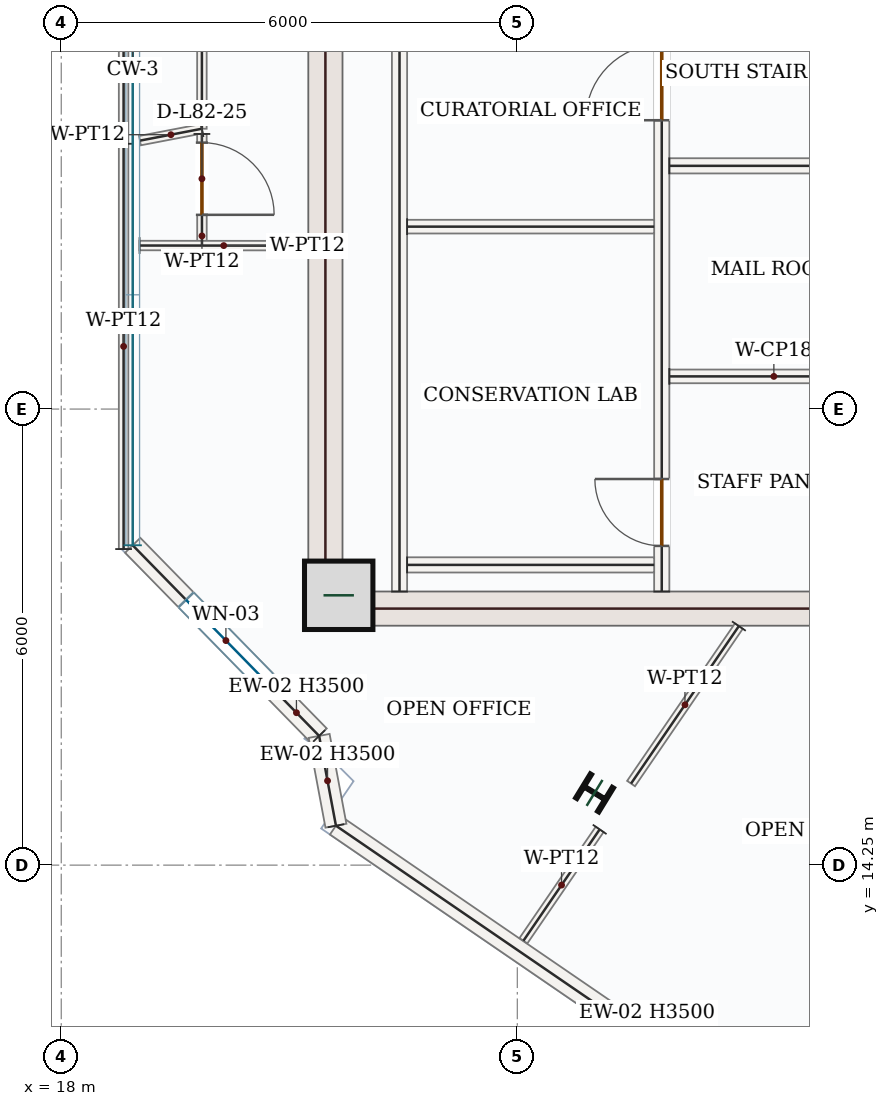
"""IFC4 building model, lengths in metres.
Left out: names, types, materials, properties, quantities, classifications, styles, units other than length and angle.
Written with IfcOpenShell. Run it as: python <this file> out.ifc"""

import sys

from ifc_helpers import new_model, si_unit, direction, frame, frame_2d, origin, origin_2d, place, context, subcontext, project, spatial, rectangle, i_section, extrude, source, transform, mapped, element, fill, save


model = new_model("IFC4")
c1 = context("Model", 3, precision=1e-05, world=origin(), true_north=direction((0.0, 1.0)))
c2 = subcontext(c1, "Body", "Model", "MODEL_VIEW")
j1 = project(units=[si_unit("LENGTHUNIT", "METRE"), si_unit("PLANEANGLEUNIT", "RADIAN")], contexts=[c1])
p1 = place(None, origin())
s1 = spatial("IfcSite", under=j1, at=p1, CompositionType="ELEMENT")
p2 = place(p1, origin())
s2 = spatial("IfcBuilding", under=s1, at=p2, CompositionType="ELEMENT")
p3 = place(p2, frame((0.0, 0.0, 338.55)))
s3 = spatial("IfcBuildingStorey", under=s2, at=p3, CompositionType="ELEMENT", Elevation=338.55)
m1 = source(origin(), c2, "Body", "SweptSolid", [
    extrude(rectangle(XDim=8.55, YDim=0.45, at=frame_2d((4.275, 0.0))), origin(), (0.0, 0.0, 1.0), 3.5),
])
p4 = place(p3, frame((21.475, 17.4, 0.0), z_axis=(0.0, 0.0, 1.0), x_axis=(0.0, 1.0, 0.0)))
e1 = element("IfcWall", 1, at=p4, inside=s3, PredefinedType="SHEAR", context=c2, shape_type="MappedRepresentation", body=[
    mapped(m1, transform((0.0, 0.0, 0.0), x_axis=(1.0, 0.0, 0.0), y_axis=(0.0, 1.0, 0.0), z_axis=(0.0, 0.0, 1.0), scale=1.0)),
])
m2 = source(origin(), c2, "Body", "SweptSolid", [
    extrude(rectangle(XDim=7.1, YDim=0.45, at=frame_2d((3.55, 0.0))), origin(), (0.0, 0.0, 1.0), 3.5),
])
p5 = place(p3, frame((21.7, 17.625, 0.0), z_axis=(0.0, 0.0, 1.0), x_axis=(1.0, 0.0, 0.0)))
e2 = element("IfcWall", 2, at=p5, inside=s3, PredefinedType="SHEAR", context=c2, shape_type="MappedRepresentation", body=[
    mapped(m2, transform((0.0, 0.0, 0.0), x_axis=(1.0, 0.0, 0.0), y_axis=(0.0, 1.0, 0.0), z_axis=(0.0, 0.0, 1.0), scale=1.0)),
])
m3 = source(origin(), c2, "Body", "SweptSolid", [
    extrude(rectangle(XDim=0.9, YDim=0.9, at=origin_2d()), origin(), (0.0, 0.0, 1.0), 3.75),
])
p6 = place(p3, frame((21.65, 17.8, 0.0), z_axis=(0.0, 0.0, 1.0), x_axis=(1.0, 0.0, 0.0)))
e3 = element("IfcColumn", 3, at=p6, inside=s3, PredefinedType="COLUMN", context=c2, shape_type="MappedRepresentation", body=[
    mapped(m3, transform((0.0, 0.0, 0.0), x_axis=(1.0, 0.0, 0.0), y_axis=(0.0, 1.0, 0.0), z_axis=(0.0, 0.0, 1.0), scale=1.0)),
])
m4 = source(origin(), c2, "Body", "SweptSolid", [
    extrude(i_section(OverallWidth=0.369, OverallDepth=0.356, WebThickness=0.011, FlangeThickness=0.018, FilletRadius=0.018, at=origin_2d()), origin(), (0.0, 0.0, 1.0), 3.75),
])
p7 = place(p3, frame((25.016, 15.2, 0.0), z_axis=(0.0, 0.0, 1.0), x_axis=(0.522498564716, 0.852640164354, 0.0)))
e4 = element("IfcColumn", 4, at=p7, inside=s3, PredefinedType="COLUMN", context=c2, shape_type="MappedRepresentation", body=[
    mapped(m4, transform((0.0, 0.0, 0.0), x_axis=(1.0, 0.0, 0.0), y_axis=(0.0, 1.0, 0.0), z_axis=(0.0, 0.0, 1.0), scale=1.0)),
])
p8 = place(p3, frame((21.393, 15.95, 0.0), z_axis=(0.0, 0.0, 1.0), x_axis=(-0.699198279454, 0.714927804753, 0.0)))
e5 = element("IfcWall", 5, at=p8, inside=s3, PredefinedType="SOLIDWALL", context=c2, shape_type="SweptSolid", body=[
    extrude(rectangle(XDim=3.508, YDim=0.28, at=frame_2d((1.754, 0.0))), origin(), (0.0, 0.0, 1.0), 3.5),
])
p9 = place(p8, frame((1.004, 0.0, 0.85)))
e6 = element("IfcOpeningElement", 6, at=p9, cuts=e5, PredefinedType="OPENING", context=c2, shape_type="SweptSolid", body=[
    extrude(rectangle(XDim=1.5, YDim=1.5, at=frame_2d((0.75, 0.75))), frame((0.0, 0.15, 0.0), z_axis=(0.0, -1.0, 0.0), x_axis=(1.0, 0.0, 0.0)), (0.0, 0.0, 1.0), 0.3),
])
m5 = source(origin(), c2, "Body", "SweptSolid", [
    extrude(rectangle(XDim=9.92, YDim=0.28, at=frame_2d((4.96, 0.0))), origin(), (0.0, 0.0, 1.0), 3.5),
])
p10 = place(p3, frame((29.799, 9.164, 0.0), z_axis=(0.0, 0.0, 1.0), x_axis=(-0.825121888295, 0.56495474992, 0.0)))
e7 = element("IfcWall", 7, at=p10, inside=s3, PredefinedType="SOLIDWALL", context=c2, shape_type="MappedRepresentation", body=[
    mapped(m5, transform((0.0, 0.0, 0.0), x_axis=(1.0, 0.0, 0.0), y_axis=(0.0, 1.0, 0.0), z_axis=(0.0, 0.0, 1.0), scale=1.0)),
])
m6 = source(origin(), c2, "Body", "SweptSolid", [
    extrude(rectangle(XDim=1.202, YDim=0.28, at=frame_2d((0.601, 0.0))), origin(), (0.0, 0.0, 1.0), 3.5),
])
p11 = place(p3, frame((21.614, 14.769, 0.0), z_axis=(0.0, 0.0, 1.0), x_axis=(-0.183994246351, 0.982927320462, 0.0)))
e8 = element("IfcWall", 8, at=p11, inside=s3, PredefinedType="SOLIDWALL", context=c2, shape_type="MappedRepresentation", body=[
    mapped(m6, transform((0.0, 0.0, 0.0), x_axis=(1.0, 0.0, 0.0), y_axis=(0.0, 1.0, 0.0), z_axis=(0.0, 0.0, 1.0), scale=1.0)),
])
m7 = source(origin(), c2, "Body", "SweptSolid", [
    extrude(rectangle(XDim=7.87, YDim=0.2, at=frame_2d((3.935, 0.0))), origin(), (0.0, 0.0, 1.0), 3.5),
])
p12 = place(p3, frame((22.45, 17.85, 0.0), z_axis=(0.0, 0.0, 1.0), x_axis=(0.0, 1.0, 0.0)))
e9 = element("IfcWall", 9, at=p12, inside=s3, PredefinedType="SOLIDWALL", context=c2, shape_type="MappedRepresentation", body=[
    mapped(m7, transform((0.0, 0.0, 0.0), x_axis=(1.0, 0.0, 0.0), y_axis=(0.0, 1.0, 0.0), z_axis=(0.0, 0.0, 1.0), scale=1.0)),
])
p13 = place(p3, frame((25.9, 17.85, 0.0), z_axis=(0.0, 0.0, 1.0), x_axis=(0.0, 1.0, 0.0)))
e10 = element("IfcWall", 10, at=p13, inside=s3, PredefinedType="SOLIDWALL", context=c2, shape_type="SweptSolid", body=[
    extrude(rectangle(XDim=8.0, YDim=0.2, at=frame_2d((4.0, 0.0))), origin(), (0.0, 0.0, 1.0), 3.5),
])
p14 = place(p13, frame((6.2, 0.0, 0.0)))
e11 = element("IfcOpeningElement", 11, at=p14, cuts=e10, PredefinedType="OPENING", context=c2, shape_type="SweptSolid", body=[
    extrude(rectangle(XDim=1.0, YDim=2.15, at=frame_2d((0.5, 1.075))), frame((0.0, 0.11, 0.0), z_axis=(0.0, -1.0, 0.0), x_axis=(1.0, 0.0, 0.0)), (0.0, 0.0, 1.0), 0.22),
])
p15 = place(p13, frame((0.6, 0.0, 0.0)))
e12 = element("IfcOpeningElement", 12, at=p15, cuts=e10, PredefinedType="OPENING", context=c2, shape_type="SweptSolid", body=[
    extrude(rectangle(XDim=0.88, YDim=2.1, at=frame_2d((0.44, 1.05))), frame((0.0, 0.11, 0.0), z_axis=(0.0, -1.0, 0.0), x_axis=(1.0, 0.0, 0.0)), (0.0, 0.0, 1.0), 0.22),
])
m8 = source(origin(), c2, "Body", "SweptSolid", [
    extrude(rectangle(XDim=3.25, YDim=0.2, at=frame_2d((1.625, 0.0))), origin(), (0.0, 0.0, 1.0), 3.5),
])
p16 = place(p3, frame((22.55, 18.2, 0.0), z_axis=(0.0, 0.0, 1.0), x_axis=(1.0, 0.0, 0.0)))
e13 = element("IfcWall", 13, at=p16, inside=s3, PredefinedType="SOLIDWALL", context=c2, shape_type="MappedRepresentation", body=[
    mapped(m8, transform((0.0, 0.0, 0.0), x_axis=(1.0, 0.0, 0.0), y_axis=(0.0, 1.0, 0.0), z_axis=(0.0, 0.0, 1.0), scale=1.0)),
])
m9 = source(origin(), c2, "Body", "SweptSolid", [
    extrude(rectangle(XDim=3.25, YDim=0.18, at=frame_2d((1.625, 0.0))), origin(), (0.0, 0.0, 1.0), 3.5),
])
p17 = place(p3, frame((22.55, 22.65, 0.0), z_axis=(0.0, 0.0, 1.0), x_axis=(1.0, 0.0, 0.0)))
e14 = element("IfcWall", 14, at=p17, inside=s3, PredefinedType="PARTITIONING", context=c2, shape_type="MappedRepresentation", body=[
    mapped(m9, transform((0.0, 0.0, 0.0), x_axis=(1.0, 0.0, 0.0), y_axis=(0.0, 1.0, 0.0), z_axis=(0.0, 0.0, 1.0), scale=1.0)),
])
m10 = source(origin(), c2, "Body", "SweptSolid", [
    extrude(rectangle(XDim=2.75, YDim=0.2, at=frame_2d((1.375, 0.0))), origin(), (0.0, 0.0, 1.0), 3.5),
])
p18 = place(p3, frame((26.0, 23.45, 0.0), z_axis=(0.0, 0.0, 1.0), x_axis=(1.0, 0.0, 0.0)))
e15 = element("IfcWall", 15, at=p18, inside=s3, PredefinedType="SOLIDWALL", context=c2, shape_type="MappedRepresentation", body=[
    mapped(m10, transform((0.0, 0.0, 0.0), x_axis=(1.0, 0.0, 0.0), y_axis=(0.0, 1.0, 0.0), z_axis=(0.0, 0.0, 1.0), scale=1.0)),
])
m11 = source(origin(), c2, "Body", "SweptSolid", [
    extrude(rectangle(XDim=2.75, YDim=0.18, at=frame_2d((1.375, 0.0))), origin(), (0.0, 0.0, 1.0), 3.5),
])
p19 = place(p3, frame((26.0, 20.68, 0.0), z_axis=(0.0, 0.0, 1.0), x_axis=(1.0, 0.0, 0.0)))
e16 = element("IfcWall", 16, at=p19, inside=s3, PredefinedType="PARTITIONING", context=c2, shape_type="MappedRepresentation", body=[
    mapped(m11, transform((0.0, 0.0, 0.0), x_axis=(1.0, 0.0, 0.0), y_axis=(0.0, 1.0, 0.0), z_axis=(0.0, 0.0, 1.0), scale=1.0)),
])
p20 = place(p3, frame((19.853, 31.53, 0.0), z_axis=(0.0, 0.0, 1.0), x_axis=(-0.000321574412, -0.999999948295, 0.0)))
e17 = element("IfcWall", 17, at=p20, inside=s3, PredefinedType="PARTITIONING", context=c2, shape_type="SweptSolid", body=[
    extrude(rectangle(XDim=7.592, YDim=0.125, at=frame_2d((3.796, 0.0))), origin(), (0.0, 0.0, 1.0), 3.5),
])
p21 = place(p20, frame((5.181, 0.0, 0.0)))
e18 = element("IfcOpeningElement", 18, at=p21, cuts=e17, PredefinedType="OPENING", context=c2, shape_type="SweptSolid", body=[
    extrude(rectangle(XDim=0.95, YDim=2.15, at=frame_2d((0.475, 1.075))), frame((0.0, 0.073, 0.0), z_axis=(0.0, -1.0, 0.0), x_axis=(1.0, 0.0, 0.0)), (0.0, 0.0, 1.0), 0.145),
])
m12 = source(origin(), c2, "Body", "SweptSolid", [
    extrude(rectangle(XDim=0.83, YDim=0.125, at=frame_2d((0.415, 0.0))), origin(), (0.0, 0.0, 1.0), 3.5),
])
p22 = place(p3, frame((19.85, 23.938, 0.0), z_axis=(0.0, 0.0, 1.0), x_axis=(-0.98205677528, -0.188585498189, 0.0)))
e19 = element("IfcWall", 19, at=p22, inside=s3, PredefinedType="PARTITIONING", context=c2, shape_type="MappedRepresentation", body=[
    mapped(m12, transform((0.0, 0.0, 0.0), x_axis=(1.0, 0.0, 0.0), y_axis=(0.0, 1.0, 0.0), z_axis=(0.0, 0.0, 1.0), scale=1.0)),
])
m13 = source(origin(), c2, "Body", "SweptSolid", [
    extrude(rectangle(XDim=6.795, YDim=0.125, at=frame_2d((3.397, 0.0))), origin(), (0.0, 0.0, 1.0), 3.5),
])
p23 = place(p3, frame((18.82, 23.74, 0.0), z_axis=(0.0, 0.0, 1.0), x_axis=(-7.1862312e-05, 0.999999997418, 0.0)))
e20 = element("IfcWall", 20, at=p23, inside=s3, PredefinedType="PARTITIONING", context=c2, shape_type="MappedRepresentation", body=[
    mapped(m13, transform((0.0, 0.0, 0.0), x_axis=(1.0, 0.0, 0.0), y_axis=(0.0, 1.0, 0.0), z_axis=(0.0, 0.0, 1.0), scale=1.0)),
])
p24 = place(p3, frame((19.85, 23.869, 0.0), z_axis=(0.0, 0.0, 1.0), x_axis=(0.000665004009, -0.999999778885, 0.0)))
e21 = element("IfcWall", 21, at=p24, inside=s3, PredefinedType="PARTITIONING", context=c2, shape_type="SweptSolid", body=[
    extrude(rectangle(XDim=1.469, YDim=0.125, at=frame_2d((0.734, 0.0))), origin(), (0.0, 0.0, 1.0), 3.5),
])
p25 = place(p24, frame((0.114, 0.0, 0.0)))
e22 = element("IfcOpeningElement", 22, at=p25, cuts=e21, PredefinedType="OPENING", context=c2, shape_type="SweptSolid", body=[
    extrude(rectangle(XDim=0.95, YDim=2.15, at=frame_2d((0.475, 1.075))), frame((0.0, 0.073, 0.0), z_axis=(0.0, -1.0, 0.0), x_axis=(1.0, 0.0, 0.0)), (0.0, 0.0, 1.0), 0.145),
])
m14 = source(origin(), c2, "Body", "SweptSolid", [
    extrude(rectangle(XDim=2.215, YDim=0.125, at=frame_2d((1.107, 0.0))), origin(), (0.0, 0.0, 1.0), 3.5),
])
p26 = place(p3, frame((19.03, 22.402, 0.0), z_axis=(0.0, 0.0, 1.0), x_axis=(0.999999702379, -0.000771519665, 0.0)))
e23 = element("IfcWall", 23, at=p26, inside=s3, PredefinedType="PARTITIONING", context=c2, shape_type="MappedRepresentation", body=[
    mapped(m14, transform((0.0, 0.0, 0.0), x_axis=(1.0, 0.0, 0.0), y_axis=(0.0, 1.0, 0.0), z_axis=(0.0, 0.0, 1.0), scale=1.0)),
])
m15 = source(origin(), c2, "Body", "SweptSolid", [
    extrude(rectangle(XDim=2.511, YDim=0.125, at=frame_2d((1.255, 0.0))), origin(), (0.0, 0.0, 1.0), 3.5),
])
p27 = place(p3, frame((26.915, 17.395, 0.0), z_axis=(0.0, 0.0, 1.0), x_axis=(-0.564980194272, -0.825104466162, 0.0)))
e24 = element("IfcWall", 24, at=p27, inside=s3, PredefinedType="PARTITIONING", context=c2, shape_type="MappedRepresentation", body=[
    mapped(m15, transform((0.0, 0.0, 0.0), x_axis=(1.0, 0.0, 0.0), y_axis=(0.0, 1.0, 0.0), z_axis=(0.0, 0.0, 1.0), scale=1.0)),
])
m16 = source(origin(), c2, "Body", "SweptSolid", [
    extrude(rectangle(XDim=1.775, YDim=0.125, at=frame_2d((0.888, 0.0))), origin(), (0.0, 0.0, 1.0), 3.5),
])
p28 = place(p3, frame((25.083, 14.72, 0.0), z_axis=(0.0, 0.0, 1.0), x_axis=(-0.56509798207, -0.825023800057, 0.0)))
e25 = element("IfcWall", 25, at=p28, inside=s3, PredefinedType="PARTITIONING", context=c2, shape_type="MappedRepresentation", body=[
    mapped(m16, transform((0.0, 0.0, 0.0), x_axis=(1.0, 0.0, 0.0), y_axis=(0.0, 1.0, 0.0), z_axis=(0.0, 0.0, 1.0), scale=1.0)),
])
m17 = source(origin(), c2, "Body", "SweptSolid", [
    extrude(rectangle(XDim=5.332, YDim=0.125, at=frame_2d((2.666, 0.0))), origin(), (0.0, 0.0, 1.0), 3.5),
])
p29 = place(p3, frame((18.82, 18.408, 0.0), z_axis=(0.0, 0.0, 1.0), x_axis=(0.0, 1.0, 0.0)))
e26 = element("IfcWall", 26, at=p29, inside=s3, PredefinedType="PARTITIONING", context=c2, shape_type="MappedRepresentation", body=[
    mapped(m17, transform((0.0, 0.0, 0.0), x_axis=(1.0, 0.0, 0.0), y_axis=(0.0, 1.0, 0.0), z_axis=(0.0, 0.0, 1.0), scale=1.0)),
])
m18 = source(origin(), c2, "Body", "SweptSolid", [
    extrude(rectangle(XDim=1.5, YDim=1.5, at=frame_2d((0.75, 0.75))), frame((0.0, 0.03, 0.0), z_axis=(0.0, -1.0, 0.0), x_axis=(1.0, 0.0, 0.0)), (0.0, 0.0, 1.0), 0.06),
])
p30 = place(p9, origin())
e27 = element("IfcWindow", 27, at=p30, inside=s3, PartitioningType="SINGLE_PANEL", PredefinedType="WINDOW", context=c2, shape_type="MappedRepresentation", body=[
    mapped(m18, transform((0.0, 0.0, 0.0), x_axis=(1.0, 0.0, 0.0), y_axis=(0.0, 1.0, 0.0), z_axis=(0.0, 0.0, 1.0), scale=1.0)),
])
fill(e6, e27)
m19 = source(origin(), c2, "Body", "SweptSolid", [
    extrude(rectangle(XDim=1.0, YDim=2.15, at=frame_2d((0.5, 1.075))), frame((0.0, 0.025, 0.0), z_axis=(0.0, -1.0, 0.0), x_axis=(1.0, 0.0, 0.0)), (0.0, 0.0, 1.0), 0.05),
])
p31 = place(p14, origin())
e28 = element("IfcDoor", 28, at=p31, inside=s3, OperationType="SINGLE_SWING_LEFT", PredefinedType="DOOR", context=c2, shape_type="MappedRepresentation", body=[
    mapped(m19, transform((0.0, 0.0, 0.0), x_axis=(1.0, 0.0, 0.0), y_axis=(0.0, 1.0, 0.0), z_axis=(0.0, 0.0, 1.0), scale=1.0)),
])
fill(e11, e28)
m20 = source(origin(), c2, "Body", "SweptSolid", [
    extrude(rectangle(XDim=0.88, YDim=2.1, at=frame_2d((0.44, 1.05))), frame((0.0, 0.025, 0.0), z_axis=(0.0, -1.0, 0.0), x_axis=(1.0, 0.0, 0.0)), (0.0, 0.0, 1.0), 0.05),
])
p32 = place(p15, origin())
e29 = element("IfcDoor", 29, at=p32, inside=s3, OperationType="SINGLE_SWING_RIGHT", PredefinedType="DOOR", context=c2, shape_type="MappedRepresentation", body=[
    mapped(m20, transform((0.0, 0.0, 0.0), x_axis=(1.0, 0.0, 0.0), y_axis=(0.0, 1.0, 0.0), z_axis=(0.0, 0.0, 1.0), scale=1.0)),
])
fill(e12, e29)
m21 = source(origin(), c2, "Body", "SweptSolid", [
    extrude(rectangle(XDim=0.95, YDim=2.15, at=frame_2d((0.475, 1.075))), frame((0.0, 0.025, 0.0), z_axis=(0.0, -1.0, 0.0), x_axis=(1.0, 0.0, 0.0)), (0.0, 0.0, 1.0), 0.05),
])
p33 = place(p25, origin())
e30 = element("IfcDoor", 30, at=p33, inside=s3, OperationType="SINGLE_SWING_RIGHT", PredefinedType="DOOR", context=c2, shape_type="MappedRepresentation", body=[
    mapped(m21, transform((0.0, 0.0, 0.0), x_axis=(1.0, 0.0, 0.0), y_axis=(0.0, 1.0, 0.0), z_axis=(0.0, 0.0, 1.0), scale=1.0)),
])
fill(e22, e30)
save(model, sys.argv[1])
